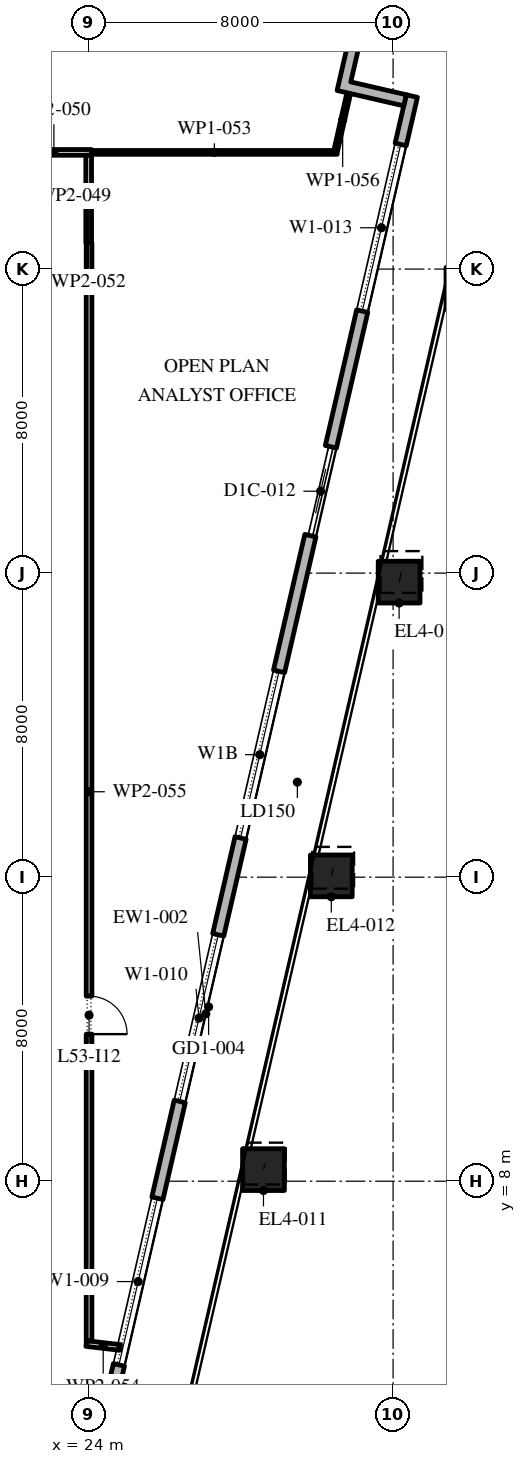
"""IFC4 building model, lengths in metres.
Left out: names, types, materials, properties, quantities, classifications, styles, units other than length and angle.
Written with IfcOpenShell. Run it as: python <this file> out.ifc"""

import sys

from ifc_helpers import new_model, si_unit, direction, frame, frame_2d, origin, origin_2d, place, context, subcontext, project, spatial, polyline, rectangle, outline, extrude, element, fill, save


model = new_model("IFC4")
c1 = context("Model", 3, precision=1e-05, world=origin(), true_north=direction((0.0, 1.0)))
c2 = subcontext(c1, "Body", "Model", "MODEL_VIEW")
j1 = project(units=[si_unit("LENGTHUNIT", "METRE"), si_unit("PLANEANGLEUNIT", "RADIAN")], contexts=[c1])
p1 = place(None, origin())
s1 = spatial("IfcSite", under=j1, at=p1, CompositionType="ELEMENT")
p2 = place(p1, origin())
s2 = spatial("IfcBuilding", under=s1, at=p2, CompositionType="ELEMENT")
p3 = place(p2, frame((0.0, 0.0, 247.2)))
s3 = spatial("IfcBuildingStorey", under=s2, at=p3, CompositionType="ELEMENT", Elevation=247.2)
p4 = place(p3, frame((28.589, 8.305, 0.0), z_axis=(0.008770884695, 0.037929719907, 0.99924191662), x_axis=(-0.974290512438, 0.225295355862, 0.0)))
e1 = element("IfcColumn", 1, at=p4, inside=s3, PredefinedType="COLUMN", context=c2, shape_type="SweptSolid", body=[
    extrude(rectangle(XDim=1.1, YDim=1.1, at=origin_2d()), origin(), (0.0, 0.0, 1.0), 4.203),
])
p5 = place(p3, frame((30.374, 16.034, 0.0), z_axis=(0.011668301382, 0.050504588071, 0.998655665045), x_axis=(-0.974334539389, 0.225104876342, 0.0)))
e2 = element("IfcColumn", 2, at=p5, inside=s3, PredefinedType="COLUMN", context=c2, shape_type="SweptSolid", body=[
    extrude(rectangle(XDim=1.1, YDim=1.1, at=origin_2d()), origin(), (0.0, 0.0, 1.0), 4.206),
])
p6 = place(p3, frame((32.158, 23.763, 0.0), z_axis=(0.014559788571, 0.063169759976, 0.997896584813), x_axis=(-0.97445148511, 0.224598092528, 0.0)))
e3 = element("IfcColumn", 3, at=p6, inside=s3, PredefinedType="COLUMN", context=c2, shape_type="SweptSolid", body=[
    extrude(rectangle(XDim=1.1, YDim=1.1, at=origin_2d()), origin(), (0.0, 0.0, 1.0), 4.209),
])
p7 = place(p3, frame((33.943, 31.492, 0.0), z_axis=(0.017444089556, 0.075687644385, 0.996978978829), x_axis=(-0.974454034257, 0.224587032398, 0.0)))
e4 = element("IfcColumn", 4, at=p7, inside=s3, PredefinedType="COLUMN", context=c2, shape_type="SweptSolid", body=[
    extrude(rectangle(XDim=1.1, YDim=1.1, at=origin_2d()), origin(), (0.0, 0.0, 1.0), 4.213),
])
p8 = place(p3, frame((21.359, -11.678, 0.0), z_axis=(0.0, 0.0, 1.0), x_axis=(0.224949198343, 0.974370493275, 0.0)))
e5 = element("IfcWall", 5, at=p8, inside=s3, PredefinedType="STANDARD", context=c2, shape_type="SweptSolid", body=[
    extrude(rectangle(XDim=49.5, YDim=0.3, at=frame_2d((24.75, 0.0))), origin(), (0.0, 0.0, 1.0), 4.0),
])
p9 = place(p8, frame((1.157, 0.0, 0.45)))
e6 = element("IfcOpeningElement", 6, at=p9, cuts=e5, PredefinedType="OPENING", context=c2, shape_type="SweptSolid", body=[
    extrude(rectangle(XDim=4.5, YDim=3.05, at=frame_2d((2.25, 1.525))), frame((0.0, 0.16, 0.0), z_axis=(0.0, -1.0, 0.0), x_axis=(1.0, 0.0, 0.0)), (0.0, 0.0, 1.0), 0.32),
])
p10 = place(p8, frame((8.121, 0.0, 0.45)))
e7 = element("IfcOpeningElement", 7, at=p10, cuts=e5, PredefinedType="OPENING", context=c2, shape_type="SweptSolid", body=[
    extrude(rectangle(XDim=4.5, YDim=3.05, at=frame_2d((2.25, 1.525))), frame((0.0, 0.16, 0.0), z_axis=(0.0, -1.0, 0.0), x_axis=(1.0, 0.0, 0.0)), (0.0, 0.0, 1.0), 0.32),
])
p11 = place(p8, frame((15.236, 0.0, 0.45)))
e8 = element("IfcOpeningElement", 8, at=p11, cuts=e5, PredefinedType="OPENING", context=c2, shape_type="SweptSolid", body=[
    extrude(rectangle(XDim=4.5, YDim=3.05, at=frame_2d((2.25, 1.525))), frame((0.0, 0.16, 0.0), z_axis=(0.0, -1.0, 0.0), x_axis=(1.0, 0.0, 0.0)), (0.0, 0.0, 1.0), 0.32),
])
p12 = place(p8, frame((22.35, 0.0, 0.45)))
e9 = element("IfcOpeningElement", 9, at=p12, cuts=e5, PredefinedType="OPENING", context=c2, shape_type="SweptSolid", body=[
    extrude(rectangle(XDim=4.5, YDim=3.05, at=frame_2d((2.25, 1.525))), frame((0.0, 0.16, 0.0), z_axis=(0.0, -1.0, 0.0), x_axis=(1.0, 0.0, 0.0)), (0.0, 0.0, 1.0), 0.32),
])
p13 = place(p8, frame((29.464, 0.0, 0.45)))
e10 = element("IfcOpeningElement", 10, at=p13, cuts=e5, PredefinedType="OPENING", context=c2, shape_type="SweptSolid", body=[
    extrude(rectangle(XDim=4.5, YDim=2.95, at=frame_2d((2.25, 1.475))), frame((0.0, 0.16, 0.0), z_axis=(0.0, -1.0, 0.0), x_axis=(1.0, 0.0, 0.0)), (0.0, 0.0, 1.0), 0.32),
])
p14 = place(p8, frame((37.628, 0.0, 0.0)))
e11 = element("IfcOpeningElement", 11, at=p14, cuts=e5, PredefinedType="OPENING", context=c2, shape_type="SweptSolid", body=[
    extrude(rectangle(XDim=2.4, YDim=3.325, at=frame_2d((1.2, 1.663))), frame((0.0, 0.16, 0.0), z_axis=(0.0, -1.0, 0.0), x_axis=(1.0, 0.0, 0.0)), (0.0, 0.0, 1.0), 0.32),
])
p15 = place(p8, frame((43.693, 0.0, 0.45)))
e12 = element("IfcOpeningElement", 12, at=p15, cuts=e5, PredefinedType="OPENING", context=c2, shape_type="SweptSolid", body=[
    extrude(rectangle(XDim=4.5, YDim=3.05, at=frame_2d((2.25, 1.525))), frame((0.0, 0.16, 0.0), z_axis=(0.0, -1.0, 0.0), x_axis=(1.0, 0.0, 0.0)), (0.0, 0.0, 1.0), 0.32),
])
p16 = place(p3, origin())
e13 = element("IfcWall", 13, at=p16, inside=s3, PredefinedType="STANDARD", context=c2, shape_type="SweptSolid", body=[
    extrude(outline(polyline([(30.931, 38.453), (29.177, 38.858), (29.65, 40.905), (29.942, 40.837), (29.537, 39.083), (31.291, 38.678), (30.886, 36.924), (32.348, 36.587), (32.28, 36.295), (30.526, 36.699), (30.931, 38.453)])), origin(), (0.0, 0.0, 1.0), 4.0),
])
p17 = place(p3, frame((22.085, 35.07, 0.0), z_axis=(0.0, 0.0, 1.0), x_axis=(1.0, 0.0, 0.0)))
e14 = element("IfcWall", 14, at=p17, inside=s3, PredefinedType="PARTITIONING", context=c2, shape_type="SweptSolid", body=[
    extrude(rectangle(XDim=1.98, YDim=0.15, at=frame_2d((0.99, 0.0))), origin(), (0.0, 0.0, 1.0), 4.0),
])
p18 = place(p3, frame((23.99, 34.995, 0.0), z_axis=(0.0, 0.0, 1.0), x_axis=(0.0, -1.0, 0.0)))
e15 = element("IfcWall", 15, at=p18, inside=s3, PredefinedType="PARTITIONING", context=c2, shape_type="SweptSolid", body=[
    extrude(rectangle(XDim=2.295, YDim=0.15, at=frame_2d((1.147, 0.0))), origin(), (0.0, 0.0, 1.0), 4.0),
])
p19 = place(p3, frame((24.065, 35.07, 0.0), z_axis=(0.0, 0.0, 1.0), x_axis=(1.0, 0.0, 0.0)))
e16 = element("IfcWall", 16, at=p19, inside=s3, PredefinedType="PARTITIONING", context=c2, shape_type="SweptSolid", body=[
    extrude(rectangle(XDim=6.465, YDim=0.1, at=frame_2d((3.232, 0.0))), origin(), (0.0, 0.0, 1.0), 4.0),
])
p20 = place(p3, frame((23.925, 3.729, 0.0), z_axis=(0.0, 0.0, 1.0), x_axis=(0.993316052643, -0.115426251616, 0.0)))
e17 = element("IfcWall", 17, at=p20, inside=s3, PredefinedType="PARTITIONING", context=c2, shape_type="SweptSolid", body=[
    extrude(rectangle(XDim=0.901, YDim=0.15, at=frame_2d((0.451, 0.0))), origin(), (0.0, 0.0, 1.0), 4.0),
])
p21 = place(p3, frame((24.0, 32.7, 0.0), z_axis=(0.0, 0.0, 1.0), x_axis=(0.0, -1.0, 0.0)))
e18 = element("IfcWall", 18, at=p21, inside=s3, PredefinedType="PARTITIONING", context=c2, shape_type="SweptSolid", body=[
    extrude(rectangle(XDim=28.905, YDim=0.15, at=frame_2d((14.453, 0.0))), origin(), (0.0, 0.0, 1.0), 4.0),
])
p22 = place(p21, frame((19.83, 0.0, 0.0)))
e19 = element("IfcOpeningElement", 19, at=p22, cuts=e18, PredefinedType="OPENING", context=c2, shape_type="SweptSolid", body=[
    extrude(rectangle(XDim=1.0, YDim=2.1, at=frame_2d((0.5, 1.05))), frame((0.0, 0.085, 0.0), z_axis=(0.0, -1.0, 0.0), x_axis=(1.0, 0.0, 0.0)), (0.0, 0.0, 1.0), 0.17),
])
p23 = place(p3, frame((30.491, 35.119, 0.0), z_axis=(0.0, 0.0, 1.0), x_axis=(0.221461033886, 0.975169221453, 0.0)))
e20 = element("IfcWall", 20, at=p23, inside=s3, PredefinedType="PARTITIONING", context=c2, shape_type="SweptSolid", body=[
    extrude(rectangle(XDim=1.648, YDim=0.1, at=frame_2d((0.824, 0.0))), origin(), (0.0, 0.0, 1.0), 4.0),
])
p24 = place(p11, origin())
e21 = element("IfcWindow", 21, at=p24, inside=s3, PartitioningType="DOUBLE_PANEL_VERTICAL", PredefinedType="WINDOW", context=c2, shape_type="SweptSolid", body=[
    extrude(rectangle(XDim=4.5, YDim=3.05, at=frame_2d((2.25, 1.525))), frame((0.0, 0.03, 0.0), z_axis=(0.0, -1.0, 0.0), x_axis=(1.0, 0.0, 0.0)), (0.0, 0.0, 1.0), 0.06),
])
fill(e8, e21)
p25 = place(p12, origin())
e22 = element("IfcWindow", 22, at=p25, inside=s3, PartitioningType="DOUBLE_PANEL_VERTICAL", PredefinedType="WINDOW", context=c2, shape_type="SweptSolid", body=[
    extrude(rectangle(XDim=4.5, YDim=3.05, at=frame_2d((2.25, 1.525))), frame((0.0, 0.03, 0.0), z_axis=(0.0, -1.0, 0.0), x_axis=(1.0, 0.0, 0.0)), (0.0, 0.0, 1.0), 0.06),
])
fill(e9, e22)
p26 = place(p13, origin())
e23 = element("IfcWindow", 23, at=p26, inside=s3, PartitioningType="DOUBLE_PANEL_VERTICAL", PredefinedType="WINDOW", context=c2, shape_type="SweptSolid", body=[
    extrude(rectangle(XDim=4.5, YDim=2.95, at=frame_2d((2.25, 1.475))), frame((0.0, 0.03, 0.0), z_axis=(0.0, -1.0, 0.0), x_axis=(1.0, 0.0, 0.0)), (0.0, 0.0, 1.0), 0.06),
])
fill(e10, e23)
p27 = place(p14, origin())
e24 = element("IfcDoor", 24, at=p27, inside=s3, OperationType="DOUBLE_DOOR_SLIDING", PredefinedType="DOOR", context=c2, shape_type="SweptSolid", body=[
    extrude(rectangle(XDim=2.4, YDim=3.325, at=frame_2d((1.2, 1.663))), frame((0.0, 0.025, 0.0), z_axis=(0.0, -1.0, 0.0), x_axis=(1.0, 0.0, 0.0)), (0.0, 0.0, 1.0), 0.05),
])
fill(e11, e24)
p28 = place(p15, origin())
e25 = element("IfcWindow", 25, at=p28, inside=s3, PartitioningType="DOUBLE_PANEL_VERTICAL", PredefinedType="WINDOW", context=c2, shape_type="SweptSolid", body=[
    extrude(rectangle(XDim=4.5, YDim=3.05, at=frame_2d((2.25, 1.525))), frame((0.0, 0.03, 0.0), z_axis=(0.0, -1.0, 0.0), x_axis=(1.0, 0.0, 0.0)), (0.0, 0.0, 1.0), 0.06),
])
fill(e12, e25)
p29 = place(p22, origin())
e26 = element("IfcDoor", 26, at=p29, inside=s3, OperationType="SINGLE_SWING_LEFT", PredefinedType="DOOR", context=c2, shape_type="SweptSolid", body=[
    extrude(rectangle(XDim=1.0, YDim=2.1, at=frame_2d((0.5, 1.05))), frame((0.0, 0.025, 0.0), z_axis=(0.0, -1.0, 0.0), x_axis=(1.0, 0.0, 0.0)), (0.0, 0.0, 1.0), 0.05),
])
fill(e19, e26)
save(model, sys.argv[1])
